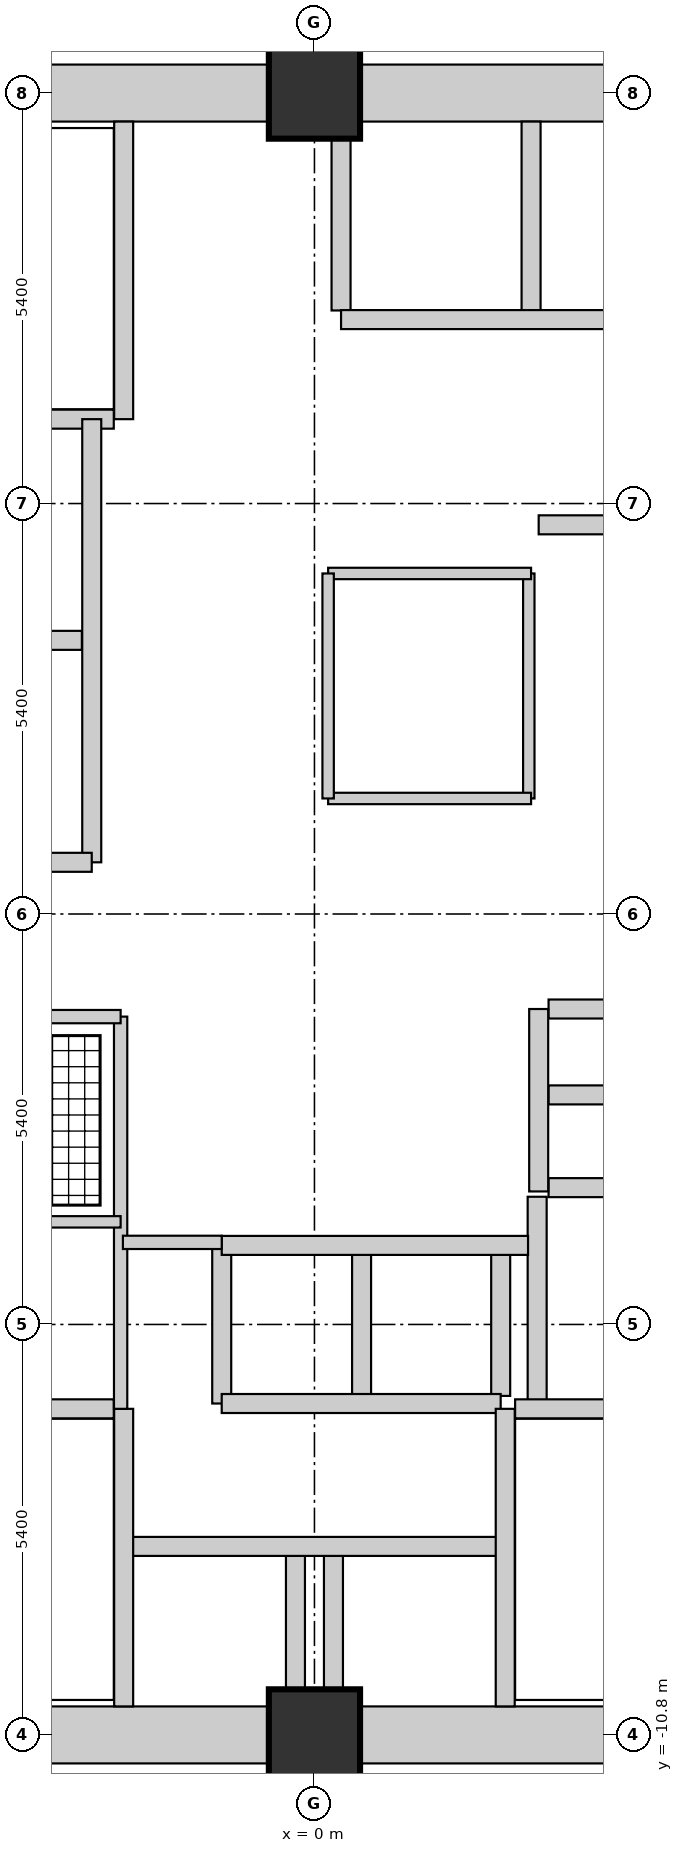
"""IFC4 building model, lengths in metres.
Left out: names, types, materials, properties, quantities, classifications, styles, units other than length and angle.
Written with IfcOpenShell. Run it as: python <this file> out.ifc"""

import sys

from ifc_helpers import new_model, si_unit, direction, frame, frame_2d, origin, origin_2d, place, context, subcontext, project, spatial, rectangle, extrude, element, fill, save


model = new_model("IFC4")
c1 = context("Model", 3, precision=1e-05, world=origin(), true_north=direction((0.0, 1.0)))
c2 = subcontext(c1, "Body", "Model", "MODEL_VIEW")
j1 = project(units=[si_unit("LENGTHUNIT", "METRE"), si_unit("PLANEANGLEUNIT", "RADIAN")], contexts=[c1])
p1 = place(None, origin())
s1 = spatial("IfcSite", under=j1, at=p1, CompositionType="ELEMENT")
p2 = place(p1, origin())
s2 = spatial("IfcBuilding", under=s1, at=p2, CompositionType="ELEMENT")
p3 = place(p2, frame((0.0, 0.0, 22.5)))
s3 = spatial("IfcBuildingStorey", under=s2, at=p3, CompositionType="ELEMENT", Elevation=22.5)
for number, where, z_axis, x_axis in (
    (1, (0.0, -10.8, 0.0), (0.0, 0.0, 1.0), (1.0, 0.0, 0.0)),
    (2, (0.0, 10.8, 0.0), (0.0, 0.0, 1.0), (1.0, 0.0, 0.0)),
):
    element("IfcColumn", number, at=place(p3, frame(where, z_axis=z_axis, x_axis=x_axis)), inside=s3, PredefinedType="COLUMN", context=c2, shape_type="SweptSolid", body=[
        extrude(rectangle(XDim=1.2, YDim=1.2, at=origin_2d()), origin(), (0.0, 0.0, 1.0), 3.75),
    ])
p4 = place(p3, frame((-4.79, -10.8, 0.0), z_axis=(0.0, 0.0, 1.0), x_axis=(1.0, 0.0, 0.0)))
e3 = element("IfcWall", 3, at=p4, inside=s3, PredefinedType="SHEAR", context=c2, shape_type="SweptSolid", body=[
    extrude(rectangle(XDim=4.18, YDim=0.75, at=frame_2d((2.09, 0.0))), origin(), (0.0, 0.0, 1.0), 3.75),
])
p5 = place(p3, frame((-4.79, 10.8, 0.0), z_axis=(0.0, 0.0, 1.0), x_axis=(1.0, 0.0, 0.0)))
e4 = element("IfcWall", 4, at=p5, inside=s3, PredefinedType="SHEAR", context=c2, shape_type="SweptSolid", body=[
    extrude(rectangle(XDim=4.18, YDim=0.75, at=frame_2d((2.09, 0.0))), origin(), (0.0, 0.0, 1.0), 3.75),
])
p6 = place(p5, frame((2.83, 0.0, 0.0)))
e5 = element("IfcOpeningElement", 5, at=p6, cuts=e4, PredefinedType="OPENING", context=c2, shape_type="SweptSolid", body=[
    extrude(rectangle(XDim=1.1, YDim=2.1, at=frame_2d((0.55, 1.05))), frame((0.0, 0.385, 0.0), z_axis=(0.0, -1.0, 0.0), x_axis=(1.0, 0.0, 0.0)), (0.0, 0.0, 1.0), 0.77),
])
for number, where, z_axis, x_axis in (
    (6, (0.61, -10.8, 0.0), (0.0, 0.0, 1.0), (1.0, 0.0, 0.0)),
    (7, (0.61, 10.8, 0.0), (0.0, 0.0, 1.0), (1.0, 0.0, 0.0)),
):
    element("IfcWall", number, at=place(p3, frame(where, z_axis=z_axis, x_axis=x_axis)), inside=s3, PredefinedType="SHEAR", context=c2, shape_type="SweptSolid", body=[
        extrude(rectangle(XDim=4.18, YDim=0.75, at=frame_2d((2.09, 0.0))), origin(), (0.0, 0.0, 1.0), 3.75),
    ])
p7 = place(p3, frame((2.93, -6.51, 0.0), z_axis=(0.0, 0.0, 1.0), x_axis=(0.0, 1.0, 0.0)))
e8 = element("IfcWall", 8, at=p7, inside=s3, PredefinedType="SHEAR", context=c2, shape_type="SweptSolid", body=[
    extrude(rectangle(XDim=2.79, YDim=0.25, at=frame_2d((1.395, 0.0))), origin(), (0.0, 0.0, 1.0), 3.75),
])
p8 = place(p3, frame((3.08, -3.6, 0.0), z_axis=(0.0, 0.0, 1.0), x_axis=(1.0, 0.0, 0.0)))
e9 = element("IfcWall", 9, at=p8, inside=s3, PredefinedType="SHEAR", context=c2, shape_type="SweptSolid", body=[
    extrude(rectangle(XDim=2.37, YDim=0.25, at=frame_2d((1.185, 0.0))), origin(), (0.0, 0.0, 1.0), 3.75),
])
for number, where, z_axis, x_axis in (
    (10, (0.62, -6.34, 0.0), (0.0, 0.0, 1.0), (0.0, 1.0, 0.0)),
    (11, (2.45, -6.34, 0.0), (0.0, 0.0, 1.0), (0.0, 1.0, 0.0)),
):
    element("IfcWall", number, at=place(p3, frame(where, z_axis=z_axis, x_axis=x_axis)), inside=s3, PredefinedType="SHEAR", context=c2, shape_type="SweptSolid", body=[
        extrude(rectangle(XDim=1.88, YDim=0.25, at=frame_2d((0.94, 0.0))), origin(), (0.0, 0.0, 1.0), 3.75),
    ])
for number, where, z_axis, x_axis in (
    (12, (-0.25, -10.2, 0.0), (0.0, 0.0, 1.0), (0.0, 1.0, 0.0)),
    (13, (0.25, -10.2, 0.0), (0.0, 0.0, 1.0), (0.0, 1.0, 0.0)),
):
    element("IfcWall", number, at=place(p3, frame(where, z_axis=z_axis, x_axis=x_axis)), inside=s3, PredefinedType="SHEAR", context=c2, shape_type="SweptSolid", body=[
        extrude(rectangle(XDim=1.76, YDim=0.25, at=frame_2d((0.88, 0.0))), origin(), (0.0, 0.0, 1.0), 3.75),
    ])
p9 = place(p3, frame((-1.22, -6.44, 0.0), z_axis=(0.0, 0.0, 1.0), x_axis=(0.0, 1.0, 0.0)))
e14 = element("IfcWall", 14, at=p9, inside=s3, PredefinedType="SHEAR", context=c2, shape_type="SweptSolid", body=[
    extrude(rectangle(XDim=2.08, YDim=0.25, at=frame_2d((1.04, 0.0))), origin(), (0.0, 0.0, 1.0), 3.75),
])
p10 = place(p3, frame((-1.22, -6.44, 0.0), z_axis=(0.0, 0.0, 1.0), x_axis=(1.0, 0.0, 0.0)))
e15 = element("IfcWall", 15, at=p10, inside=s3, PredefinedType="SHEAR", context=c2, shape_type="SweptSolid", body=[
    extrude(rectangle(XDim=3.67, YDim=0.25, at=frame_2d((1.835, 0.0))), origin(), (0.0, 0.0, 1.0), 3.75),
])
p11 = place(p3, frame((-2.48, -8.32, 0.0), z_axis=(0.0, 0.0, 1.0), x_axis=(1.0, 0.0, 0.0)))
e16 = element("IfcWall", 16, at=p11, inside=s3, PredefinedType="SHEAR", context=c2, shape_type="SweptSolid", body=[
    extrude(rectangle(XDim=4.93, YDim=0.25, at=frame_2d((2.465, 0.0))), origin(), (0.0, 0.0, 1.0), 3.75),
])
p12 = place(p3, frame((-1.22, -4.36, 0.0), z_axis=(0.0, 0.0, 1.0), x_axis=(1.0, 0.0, 0.0)))
e17 = element("IfcWall", 17, at=p12, inside=s3, PredefinedType="SHEAR", context=c2, shape_type="SweptSolid", body=[
    extrude(rectangle(XDim=4.03, YDim=0.25, at=frame_2d((2.015, 0.0))), origin(), (0.0, 0.0, 1.0), 3.75),
])
p13 = place(p3, frame((2.85, 7.94, 0.0), z_axis=(0.0, 0.0, 1.0), x_axis=(0.0, 1.0, 0.0)))
e18 = element("IfcWall", 18, at=p13, inside=s3, PredefinedType="SHEAR", context=c2, shape_type="SweptSolid", body=[
    extrude(rectangle(XDim=2.485, YDim=0.25, at=frame_2d((1.243, 0.0))), origin(), (0.0, 0.0, 1.0), 3.75),
])
p14 = place(p3, frame((0.35, 7.94, 0.0), z_axis=(0.0, 0.0, 1.0), x_axis=(0.0, 1.0, 0.0)))
e19 = element("IfcWall", 19, at=p14, inside=s3, PredefinedType="SHEAR", context=c2, shape_type="SweptSolid", body=[
    extrude(rectangle(XDim=2.26, YDim=0.25, at=frame_2d((1.13, 0.0))), origin(), (0.0, 0.0, 1.0), 3.75),
])
p15 = place(p3, frame((0.35, 7.82, 0.0), z_axis=(0.0, 0.0, 1.0), x_axis=(1.0, 0.0, 0.0)))
e20 = element("IfcWall", 20, at=p15, inside=s3, PredefinedType="SHEAR", context=c2, shape_type="SweptSolid", body=[
    extrude(rectangle(XDim=10.075, YDim=0.25, at=frame_2d((5.038, 0.0))), origin(), (0.0, 0.0, 1.0), 3.75),
])
p16 = place(p15, frame((0.7, 0.0, 0.0)))
e21 = element("IfcOpeningElement", 21, at=p16, cuts=e20, PredefinedType="OPENING", context=c2, shape_type="SweptSolid", body=[
    extrude(rectangle(XDim=1.1, YDim=2.1, at=frame_2d((0.55, 1.05))), frame((0.0, 0.135, 0.0), z_axis=(0.0, -1.0, 0.0), x_axis=(1.0, 0.0, 0.0)), (0.0, 0.0, 1.0), 0.27),
])
p17 = place(p15, frame((3.2, 0.0, 0.0)))
e22 = element("IfcOpeningElement", 22, at=p17, cuts=e20, PredefinedType="OPENING", context=c2, shape_type="SweptSolid", body=[
    extrude(rectangle(XDim=1.1, YDim=2.1, at=frame_2d((0.55, 1.05))), frame((0.0, 0.135, 0.0), z_axis=(0.0, -1.0, 0.0), x_axis=(1.0, 0.0, 0.0)), (0.0, 0.0, 1.0), 0.27),
])
p18 = place(p15, frame((5.7, 0.0, 0.0)))
e23 = element("IfcOpeningElement", 23, at=p18, cuts=e20, PredefinedType="OPENING", context=c2, shape_type="SweptSolid", body=[
    extrude(rectangle(XDim=1.1, YDim=2.1, at=frame_2d((0.55, 1.05))), frame((0.0, 0.135, 0.0), z_axis=(0.0, -1.0, 0.0), x_axis=(1.0, 0.0, 0.0)), (0.0, 0.0, 1.0), 0.27),
])
p19 = place(p15, frame((8.2, 0.0, 0.0)))
e24 = element("IfcOpeningElement", 24, at=p19, cuts=e20, PredefinedType="OPENING", context=c2, shape_type="SweptSolid", body=[
    extrude(rectangle(XDim=1.1, YDim=2.1, at=frame_2d((0.55, 1.05))), frame((0.0, 0.135, 0.0), z_axis=(0.0, -1.0, 0.0), x_axis=(1.0, 0.0, 0.0)), (0.0, 0.0, 1.0), 0.27),
])
p20 = place(p3, frame((2.95, 5.12, 0.0), z_axis=(0.0, 0.0, 1.0), x_axis=(1.0, 0.0, 0.0)))
e25 = element("IfcWall", 25, at=p20, inside=s3, PredefinedType="SHEAR", context=c2, shape_type="SweptSolid", body=[
    extrude(rectangle(XDim=7.25, YDim=0.25, at=frame_2d((3.625, 0.0))), origin(), (0.0, 0.0, 1.0), 3.75),
])
for number, where, z_axis, x_axis in (
    (26, (3.08, -2.38, 0.0), (0.0, 0.0, 1.0), (1.0, 0.0, 0.0)),
    (27, (3.08, -1.25, 0.0), (0.0, 0.0, 1.0), (1.0, 0.0, 0.0)),
):
    element("IfcWall", number, at=place(p3, frame(where, z_axis=z_axis, x_axis=x_axis)), inside=s3, PredefinedType="SHEAR", context=c2, shape_type="SweptSolid", body=[
        extrude(rectangle(XDim=2.37, YDim=0.25, at=frame_2d((1.185, 0.0))), origin(), (0.0, 0.0, 1.0), 3.75),
    ])
p21 = place(p3, frame((2.95, -3.65, 0.0), z_axis=(0.0, 0.0, 1.0), x_axis=(0.0, 1.0, 0.0)))
e28 = element("IfcWall", 28, at=p21, inside=s3, PredefinedType="SHEAR", context=c2, shape_type="SweptSolid", body=[
    extrude(rectangle(XDim=2.4, YDim=0.25, at=frame_2d((1.2, 0.0))), origin(), (0.0, 0.0, 1.0), 3.75),
])
p22 = place(p21, frame((0.775, 0.0, 0.0)))
e29 = element("IfcOpeningElement", 29, at=p22, cuts=e28, PredefinedType="OPENING", context=c2, shape_type="SweptSolid", body=[
    extrude(rectangle(XDim=0.85, YDim=2.1, at=frame_2d((0.425, 1.05))), frame((0.0, 0.135, 0.0), z_axis=(0.0, -1.0, 0.0), x_axis=(1.0, 0.0, 0.0)), (0.0, 0.0, 1.0), 0.27),
])
p23 = place(p3, frame((-2.51, 6.51, 0.0), z_axis=(0.0, 0.0, 1.0), x_axis=(0.0, 1.0, 0.0)))
e30 = element("IfcWall", 30, at=p23, inside=s3, PredefinedType="SHEAR", context=c2, shape_type="SweptSolid", body=[
    extrude(rectangle(XDim=3.915, YDim=0.25, at=frame_2d((1.958, 0.0))), origin(), (0.0, 0.0, 1.0), 3.75),
])
p24 = place(p3, frame((-10.34, 6.51, 0.0), z_axis=(0.0, 0.0, 1.0), x_axis=(1.0, 0.0, 0.0)))
e31 = element("IfcWall", 31, at=p24, inside=s3, PredefinedType="SHEAR", context=c2, shape_type="SweptSolid", body=[
    extrude(rectangle(XDim=7.7, YDim=0.25, at=frame_2d((3.85, 0.0))), origin(), (0.0, 0.0, 1.0), 3.75),
])
p25 = place(p24, frame((0.35, 0.0, 0.0)))
e32 = element("IfcOpeningElement", 32, at=p25, cuts=e31, PredefinedType="OPENING", context=c2, shape_type="SweptSolid", body=[
    extrude(rectangle(XDim=1.1, YDim=2.1, at=frame_2d((0.55, 1.05))), frame((0.0, 0.135, 0.0), z_axis=(0.0, -1.0, 0.0), x_axis=(1.0, 0.0, 0.0)), (0.0, 0.0, 1.0), 0.27),
])
p26 = place(p3, frame((2.64, -6.51, 0.0), z_axis=(0.0, 0.0, 1.0), x_axis=(1.0, 0.0, 0.0)))
e33 = element("IfcWall", 33, at=p26, inside=s3, PredefinedType="SHEAR", context=c2, shape_type="SweptSolid", body=[
    extrude(rectangle(XDim=7.7, YDim=0.25, at=frame_2d((3.85, 0.0))), origin(), (0.0, 0.0, 1.0), 3.75),
])
p27 = place(p26, frame((6.0, 0.0, 0.0)))
e34 = element("IfcOpeningElement", 34, at=p27, cuts=e33, PredefinedType="OPENING", context=c2, shape_type="SweptSolid", body=[
    extrude(rectangle(XDim=0.95, YDim=2.1, at=frame_2d((0.475, 1.05))), frame((0.0, 0.135, 0.0), z_axis=(0.0, -1.0, 0.0), x_axis=(1.0, 0.0, 0.0)), (0.0, 0.0, 1.0), 0.27),
])
for number, where, z_axis, x_axis in (
    (35, (2.51, -10.425, 0.0), (0.0, 0.0, 1.0), (0.0, 1.0, 0.0)),
    (36, (-2.51, -10.425, 0.0), (0.0, 0.0, 1.0), (0.0, 1.0, 0.0)),
):
    element("IfcWall", number, at=place(p3, frame(where, z_axis=z_axis, x_axis=x_axis)), inside=s3, PredefinedType="SHEAR", context=c2, shape_type="SweptSolid", body=[
        extrude(rectangle(XDim=3.915, YDim=0.25, at=frame_2d((1.958, 0.0))), origin(), (0.0, 0.0, 1.0), 3.75),
    ])
p28 = place(p3, frame((-10.34, -6.51, 0.0), z_axis=(0.0, 0.0, 1.0), x_axis=(1.0, 0.0, 0.0)))
e37 = element("IfcWall", 37, at=p28, inside=s3, PredefinedType="SHEAR", context=c2, shape_type="SweptSolid", body=[
    extrude(rectangle(XDim=7.7, YDim=0.25, at=frame_2d((3.85, 0.0))), origin(), (0.0, 0.0, 1.0), 3.75),
])
p29 = place(p28, frame((0.35, 0.0, 0.0)))
e38 = element("IfcOpeningElement", 38, at=p29, cuts=e37, PredefinedType="OPENING", context=c2, shape_type="SweptSolid", body=[
    extrude(rectangle(XDim=1.1, YDim=2.1, at=frame_2d((0.55, 1.05))), frame((0.0, 0.135, 0.0), z_axis=(0.0, -1.0, 0.0), x_axis=(1.0, 0.0, 0.0)), (0.0, 0.0, 1.0), 0.27),
])
p30 = place(p3, frame((-2.93, 0.68, 0.0), z_axis=(0.0, 0.0, 1.0), x_axis=(0.0, 1.0, 0.0)))
e39 = element("IfcWall", 39, at=p30, inside=s3, PredefinedType="SHEAR", context=c2, shape_type="SweptSolid", body=[
    extrude(rectangle(XDim=5.83, YDim=0.25, at=frame_2d((2.915, 0.0))), origin(), (0.0, 0.0, 1.0), 3.75),
])
p31 = place(p30, frame((0.75, 0.0, 0.0)))
e40 = element("IfcOpeningElement", 40, at=p31, cuts=e39, PredefinedType="OPENING", context=c2, shape_type="SweptSolid", body=[
    extrude(rectangle(XDim=1.2, YDim=2.1, at=frame_2d((0.6, 1.05))), frame((0.0, 0.135, 0.0), z_axis=(0.0, -1.0, 0.0), x_axis=(1.0, 0.0, 0.0)), (0.0, 0.0, 1.0), 0.27),
])
p32 = place(p3, frame((-5.45, 3.6, 0.0), z_axis=(0.0, 0.0, 1.0), x_axis=(1.0, 0.0, 0.0)))
e41 = element("IfcWall", 41, at=p32, inside=s3, PredefinedType="SHEAR", context=c2, shape_type="SweptSolid", body=[
    extrude(rectangle(XDim=2.39, YDim=0.25, at=frame_2d((1.195, 0.0))), origin(), (0.0, 0.0, 1.0), 3.75),
])
p33 = place(p3, frame((-5.58, 0.68, 0.0), z_axis=(0.0, 0.0, 1.0), x_axis=(1.0, 0.0, 0.0)))
e42 = element("IfcWall", 42, at=p33, inside=s3, PredefinedType="SHEAR", context=c2, shape_type="SweptSolid", body=[
    extrude(rectangle(XDim=2.65, YDim=0.25, at=frame_2d((1.325, 0.0))), origin(), (0.0, 0.0, 1.0), 3.75),
])
p34 = place(p3, frame((2.82, 1.52, 0.0), z_axis=(0.0, 0.0, 1.0), x_axis=(0.0, 1.0, 0.0)))
e43 = element("IfcWall", 43, at=p34, inside=s3, PredefinedType="PARTITIONING", context=c2, shape_type="SweptSolid", body=[
    extrude(rectangle(XDim=2.96, YDim=0.15, at=frame_2d((1.48, 0.0))), origin(), (0.0, 0.0, 1.0), 3.57),
])
for number, where, z_axis, x_axis in (
    (44, (0.18, 4.48, 0.0), (0.0, 0.0, 1.0), (1.0, 0.0, 0.0)),
    (45, (0.18, 1.52, 0.0), (0.0, 0.0, 1.0), (1.0, 0.0, 0.0)),
):
    element("IfcWall", number, at=place(p3, frame(where, z_axis=z_axis, x_axis=x_axis)), inside=s3, PredefinedType="PARTITIONING", context=c2, shape_type="SweptSolid", body=[
        extrude(rectangle(XDim=2.67, YDim=0.15, at=frame_2d((1.335, 0.0))), origin(), (0.0, 0.0, 1.0), 3.57),
    ])
p35 = place(p3, frame((0.18, 1.52, 0.0), z_axis=(0.0, 0.0, 1.0), x_axis=(0.0, 1.0, 0.0)))
e46 = element("IfcWall", 46, at=p35, inside=s3, PredefinedType="PARTITIONING", context=c2, shape_type="SweptSolid", body=[
    extrude(rectangle(XDim=2.96, YDim=0.15, at=frame_2d((1.48, 0.0))), origin(), (0.0, 0.0, 1.0), 3.57),
])
p36 = place(p35, frame((0.95, 0.0, 0.0)))
e47 = element("IfcOpeningElement", 47, at=p36, cuts=e46, PredefinedType="OPENING", context=c2, shape_type="SweptSolid", body=[
    extrude(rectangle(XDim=0.85, YDim=2.1, at=frame_2d((0.425, 1.05))), frame((0.0, 0.085, 0.0), z_axis=(0.0, -1.0, 0.0), x_axis=(1.0, 0.0, 0.0)), (0.0, 0.0, 1.0), 0.17),
])
p37 = place(p3, frame((-2.55, -6.51, 0.0), z_axis=(0.0, 0.0, 1.0), x_axis=(0.0, 1.0, 0.0)))
e48 = element("IfcWall", 48, at=p37, inside=s3, PredefinedType="PARTITIONING", context=c2, shape_type="SweptSolid", body=[
    extrude(rectangle(XDim=5.16, YDim=0.175, at=frame_2d((2.58, 0.0))), origin(), (0.0, 0.0, 1.0), 3.57),
])
p38 = place(p37, frame((3.3, 0.0, 0.0)))
e49 = element("IfcOpeningElement", 49, at=p38, cuts=e48, PredefinedType="OPENING", context=c2, shape_type="SweptSolid", body=[
    extrude(rectangle(XDim=0.85, YDim=2.1, at=frame_2d((0.425, 1.05))), frame((0.0, 0.097, 0.0), z_axis=(0.0, -1.0, 0.0), x_axis=(1.0, 0.0, 0.0)), (0.0, 0.0, 1.0), 0.195),
])
p39 = place(p3, frame((-7.18, -4.05, 0.0), z_axis=(0.0, 0.0, 1.0), x_axis=(1.0, 0.0, 0.0)))
e50 = element("IfcWall", 50, at=p39, inside=s3, PredefinedType="PARTITIONING", context=c2, shape_type="SweptSolid", body=[
    extrude(rectangle(XDim=4.63, YDim=0.15, at=frame_2d((2.315, 0.0))), origin(), (0.0, 0.0, 1.0), 3.57),
])
p40 = place(p39, frame((1.0, 0.0, 0.0)))
e51 = element("IfcOpeningElement", 51, at=p40, cuts=e50, PredefinedType="OPENING", context=c2, shape_type="SweptSolid", body=[
    extrude(rectangle(XDim=0.85, YDim=2.1, at=frame_2d((0.425, 1.05))), frame((0.0, 0.085, 0.0), z_axis=(0.0, -1.0, 0.0), x_axis=(1.0, 0.0, 0.0)), (0.0, 0.0, 1.0), 0.17),
])
p41 = place(p3, frame((-7.18, -1.35, 0.0), z_axis=(0.0, 0.0, 1.0), x_axis=(1.0, 0.0, 0.0)))
e52 = element("IfcWall", 52, at=p41, inside=s3, PredefinedType="PARTITIONING", context=c2, shape_type="SweptSolid", body=[
    extrude(rectangle(XDim=4.63, YDim=0.175, at=frame_2d((2.315, 0.0))), origin(), (0.0, 0.0, 1.0), 3.57),
])
p42 = place(p3, frame((-2.52, -4.32, 0.0), z_axis=(0.0, 0.0, 1.0), x_axis=(1.0, 0.0, 0.0)))
e53 = element("IfcWall", 53, at=p42, inside=s3, PredefinedType="PARTITIONING", context=c2, shape_type="SweptSolid", body=[
    extrude(rectangle(XDim=1.3, YDim=0.175, at=frame_2d((0.65, 0.0))), origin(), (0.0, 0.0, 1.0), 3.57),
])
p43 = place(p42, frame((0.22, 0.0, 0.0)))
e54 = element("IfcOpeningElement", 54, at=p43, cuts=e53, PredefinedType="OPENING", context=c2, shape_type="SweptSolid", body=[
    extrude(rectangle(XDim=0.85, YDim=2.1, at=frame_2d((0.425, 1.05))), frame((0.0, 0.097, 0.0), z_axis=(0.0, -1.0, 0.0), x_axis=(1.0, 0.0, 0.0)), (0.0, 0.0, 1.0), 0.195),
])
p44 = place(p36, origin())
e55 = element("IfcDoor", 55, at=p44, inside=s3, OperationType="SINGLE_SWING_RIGHT", PredefinedType="DOOR", context=c2, shape_type="SweptSolid", body=[
    extrude(rectangle(XDim=0.85, YDim=2.1, at=frame_2d((0.425, 1.05))), frame((0.0, 0.025, 0.0), z_axis=(0.0, -1.0, 0.0), x_axis=(1.0, 0.0, 0.0)), (0.0, 0.0, 1.0), 0.05),
])
fill(e47, e55)
p45 = place(p22, origin())
e56 = element("IfcDoor", 56, at=p45, inside=s3, OperationType="SINGLE_SWING_LEFT", PredefinedType="DOOR", context=c2, shape_type="SweptSolid", body=[
    extrude(rectangle(XDim=0.85, YDim=2.1, at=frame_2d((0.425, 1.05))), frame((0.0, 0.025, 0.0), z_axis=(0.0, -1.0, 0.0), x_axis=(1.0, 0.0, 0.0)), (0.0, 0.0, 1.0), 0.05),
])
fill(e29, e56)
p46 = place(p6, origin())
e57 = element("IfcDoor", 57, at=p46, inside=s3, OperationType="SINGLE_SWING_LEFT", PredefinedType="DOOR", context=c2, shape_type="SweptSolid", body=[
    extrude(rectangle(XDim=1.1, YDim=2.1, at=frame_2d((0.55, 1.05))), frame((0.0, 0.025, 0.0), z_axis=(0.0, -1.0, 0.0), x_axis=(1.0, 0.0, 0.0)), (0.0, 0.0, 1.0), 0.05),
])
fill(e5, e57)
p47 = place(p31, origin())
e58 = element("IfcDoor", 58, at=p47, inside=s3, OperationType="SLIDING_TO_LEFT", PredefinedType="DOOR", context=c2, shape_type="SweptSolid", body=[
    extrude(rectangle(XDim=1.2, YDim=2.1, at=frame_2d((0.6, 1.05))), frame((0.0, 0.025, 0.0), z_axis=(0.0, -1.0, 0.0), x_axis=(1.0, 0.0, 0.0)), (0.0, 0.0, 1.0), 0.05),
])
fill(e40, e58)
p48 = place(p16, origin())
e59 = element("IfcDoor", 59, at=p48, inside=s3, OperationType="SLIDING_TO_LEFT", PredefinedType="DOOR", context=c2, shape_type="SweptSolid", body=[
    extrude(rectangle(XDim=1.1, YDim=2.1, at=frame_2d((0.55, 1.05))), frame((0.0, 0.025, 0.0), z_axis=(0.0, -1.0, 0.0), x_axis=(1.0, 0.0, 0.0)), (0.0, 0.0, 1.0), 0.05),
])
fill(e21, e59)
p49 = place(p17, origin())
e60 = element("IfcDoor", 60, at=p49, inside=s3, OperationType="SLIDING_TO_LEFT", PredefinedType="DOOR", context=c2, shape_type="SweptSolid", body=[
    extrude(rectangle(XDim=1.1, YDim=2.1, at=frame_2d((0.55, 1.05))), frame((0.0, 0.025, 0.0), z_axis=(0.0, -1.0, 0.0), x_axis=(1.0, 0.0, 0.0)), (0.0, 0.0, 1.0), 0.05),
])
fill(e22, e60)
p50 = place(p43, origin())
e61 = element("IfcDoor", 61, at=p50, inside=s3, OperationType="SINGLE_SWING_LEFT", PredefinedType="DOOR", context=c2, shape_type="SweptSolid", body=[
    extrude(rectangle(XDim=0.85, YDim=2.1, at=frame_2d((0.425, 1.05))), frame((0.0, 0.025, 0.0), z_axis=(0.0, -1.0, 0.0), x_axis=(1.0, 0.0, 0.0)), (0.0, 0.0, 1.0), 0.05),
])
fill(e54, e61)
p51 = place(p38, origin())
e62 = element("IfcDoor", 62, at=p51, inside=s3, OperationType="SINGLE_SWING_LEFT", PredefinedType="DOOR", context=c2, shape_type="SweptSolid", body=[
    extrude(rectangle(XDim=0.85, YDim=2.1, at=frame_2d((0.425, 1.05))), frame((0.0, 0.025, 0.0), z_axis=(0.0, -1.0, 0.0), x_axis=(1.0, 0.0, 0.0)), (0.0, 0.0, 1.0), 0.05),
])
fill(e49, e62)
save(model, sys.argv[1])
